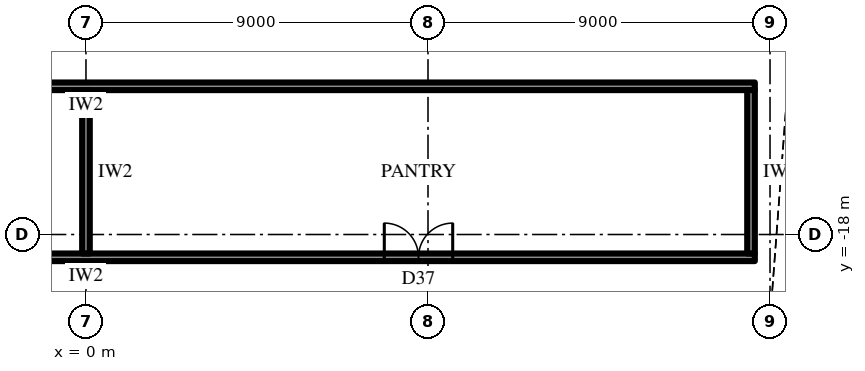
"""IFC4 building model, lengths in metres.
Left out: names, types, materials, properties, quantities, classifications, styles, units other than length and angle.
Written with IfcOpenShell. Run it as: python <this file> out.ifc"""

import sys

from ifc_helpers import new_model, si_unit, direction, frame, frame_2d, origin, place, context, subcontext, project, spatial, rectangle, extrude, element, fill, save


model = new_model("IFC4")
c1 = context("Model", 3, precision=1e-05, world=origin(), true_north=direction((0.0, 1.0)))
c2 = subcontext(c1, "Body", "Model", "MODEL_VIEW")
j1 = project(units=[si_unit("LENGTHUNIT", "METRE"), si_unit("PLANEANGLEUNIT", "RADIAN")], contexts=[c1])
p1 = place(None, origin())
s1 = spatial("IfcSite", under=j1, at=p1, CompositionType="ELEMENT")
p2 = place(p1, origin())
s2 = spatial("IfcBuilding", under=s1, at=p2, CompositionType="ELEMENT")
p3 = place(p2, frame((0.0, 0.0, 178.3)))
s3 = spatial("IfcBuildingStorey", under=s2, at=p3, CompositionType="ELEMENT", Elevation=178.3)
p4 = place(p3, frame((17.6, -14.1, 0.0), z_axis=(0.0, 0.0, 1.0), x_axis=(-1.0, 0.0, 0.0)))
e1 = element("IfcWall", 1, at=p4, inside=s3, PredefinedType="PARTITIONING", context=c2, shape_type="SweptSolid", body=[
    extrude(rectangle(XDim=35.2, YDim=0.2, at=frame_2d((17.6, 0.0))), origin(), (0.0, 0.0, 1.0), 4.0),
])
p5 = place(p3, frame((17.6, -18.6, 0.0), z_axis=(0.0, 0.0, 1.0), x_axis=(-1.0, 0.0, 0.0)))
e2 = element("IfcWall", 2, at=p5, inside=s3, PredefinedType="PARTITIONING", context=c2, shape_type="SweptSolid", body=[
    extrude(rectangle(XDim=35.2, YDim=0.2, at=frame_2d((17.6, 0.0))), origin(), (0.0, 0.0, 1.0), 4.0),
])
p6 = place(p5, frame((7.95, 0.0, 0.0)))
e3 = element("IfcOpeningElement", 3, at=p6, cuts=e2, PredefinedType="OPENING", context=c2, shape_type="SweptSolid", body=[
    extrude(rectangle(XDim=1.8, YDim=2.4, at=frame_2d((0.9, 1.2))), frame((0.0, 0.11, 0.0), z_axis=(0.0, -1.0, 0.0), x_axis=(1.0, 0.0, 0.0)), (0.0, 0.0, 1.0), 0.22),
])
p7 = place(p5, frame((25.45, 0.0, 0.0)))
e4 = element("IfcOpeningElement", 4, at=p7, cuts=e2, PredefinedType="OPENING", context=c2, shape_type="SweptSolid", body=[
    extrude(rectangle(XDim=1.8, YDim=2.4, at=frame_2d((0.9, 1.2))), frame((0.0, 0.11, 0.0), z_axis=(0.0, -1.0, 0.0), x_axis=(1.0, 0.0, 0.0)), (0.0, 0.0, 1.0), 0.22),
])
p8 = place(p3, frame((17.5, -14.2, 0.0), z_axis=(0.0, 0.0, 1.0), x_axis=(0.0, -1.0, 0.0)))
e5 = element("IfcWall", 5, at=p8, inside=s3, PredefinedType="PARTITIONING", context=c2, shape_type="SweptSolid", body=[
    extrude(rectangle(XDim=4.3, YDim=0.2, at=frame_2d((2.15, 0.0))), origin(), (0.0, 0.0, 1.0), 4.0),
])
p9 = place(p3, frame((0.0, -14.2, 0.0), z_axis=(0.0, 0.0, 1.0), x_axis=(0.0, -1.0, 0.0)))
e6 = element("IfcWall", 6, at=p9, inside=s3, PredefinedType="PARTITIONING", context=c2, shape_type="SweptSolid", body=[
    extrude(rectangle(XDim=4.3, YDim=0.2, at=frame_2d((2.15, 0.0))), origin(), (0.0, 0.0, 1.0), 2.992),
])
p10 = place(p6, frame((1.8, 0.0, 0.0), z_axis=(0.0, 0.0, 1.0), x_axis=(-1.0, 0.0, 0.0)))
e7 = element("IfcDoor", 7, at=p10, inside=s3, OperationType="DOUBLE_DOOR_SINGLE_SWING", PredefinedType="DOOR", context=c2, shape_type="SweptSolid", body=[
    extrude(rectangle(XDim=1.8, YDim=2.4, at=frame_2d((0.9, 1.2))), frame((0.0, 0.025, 0.0), z_axis=(0.0, -1.0, 0.0), x_axis=(1.0, 0.0, 0.0)), (0.0, 0.0, 1.0), 0.05),
])
fill(e3, e7)
save(model, sys.argv[1])
